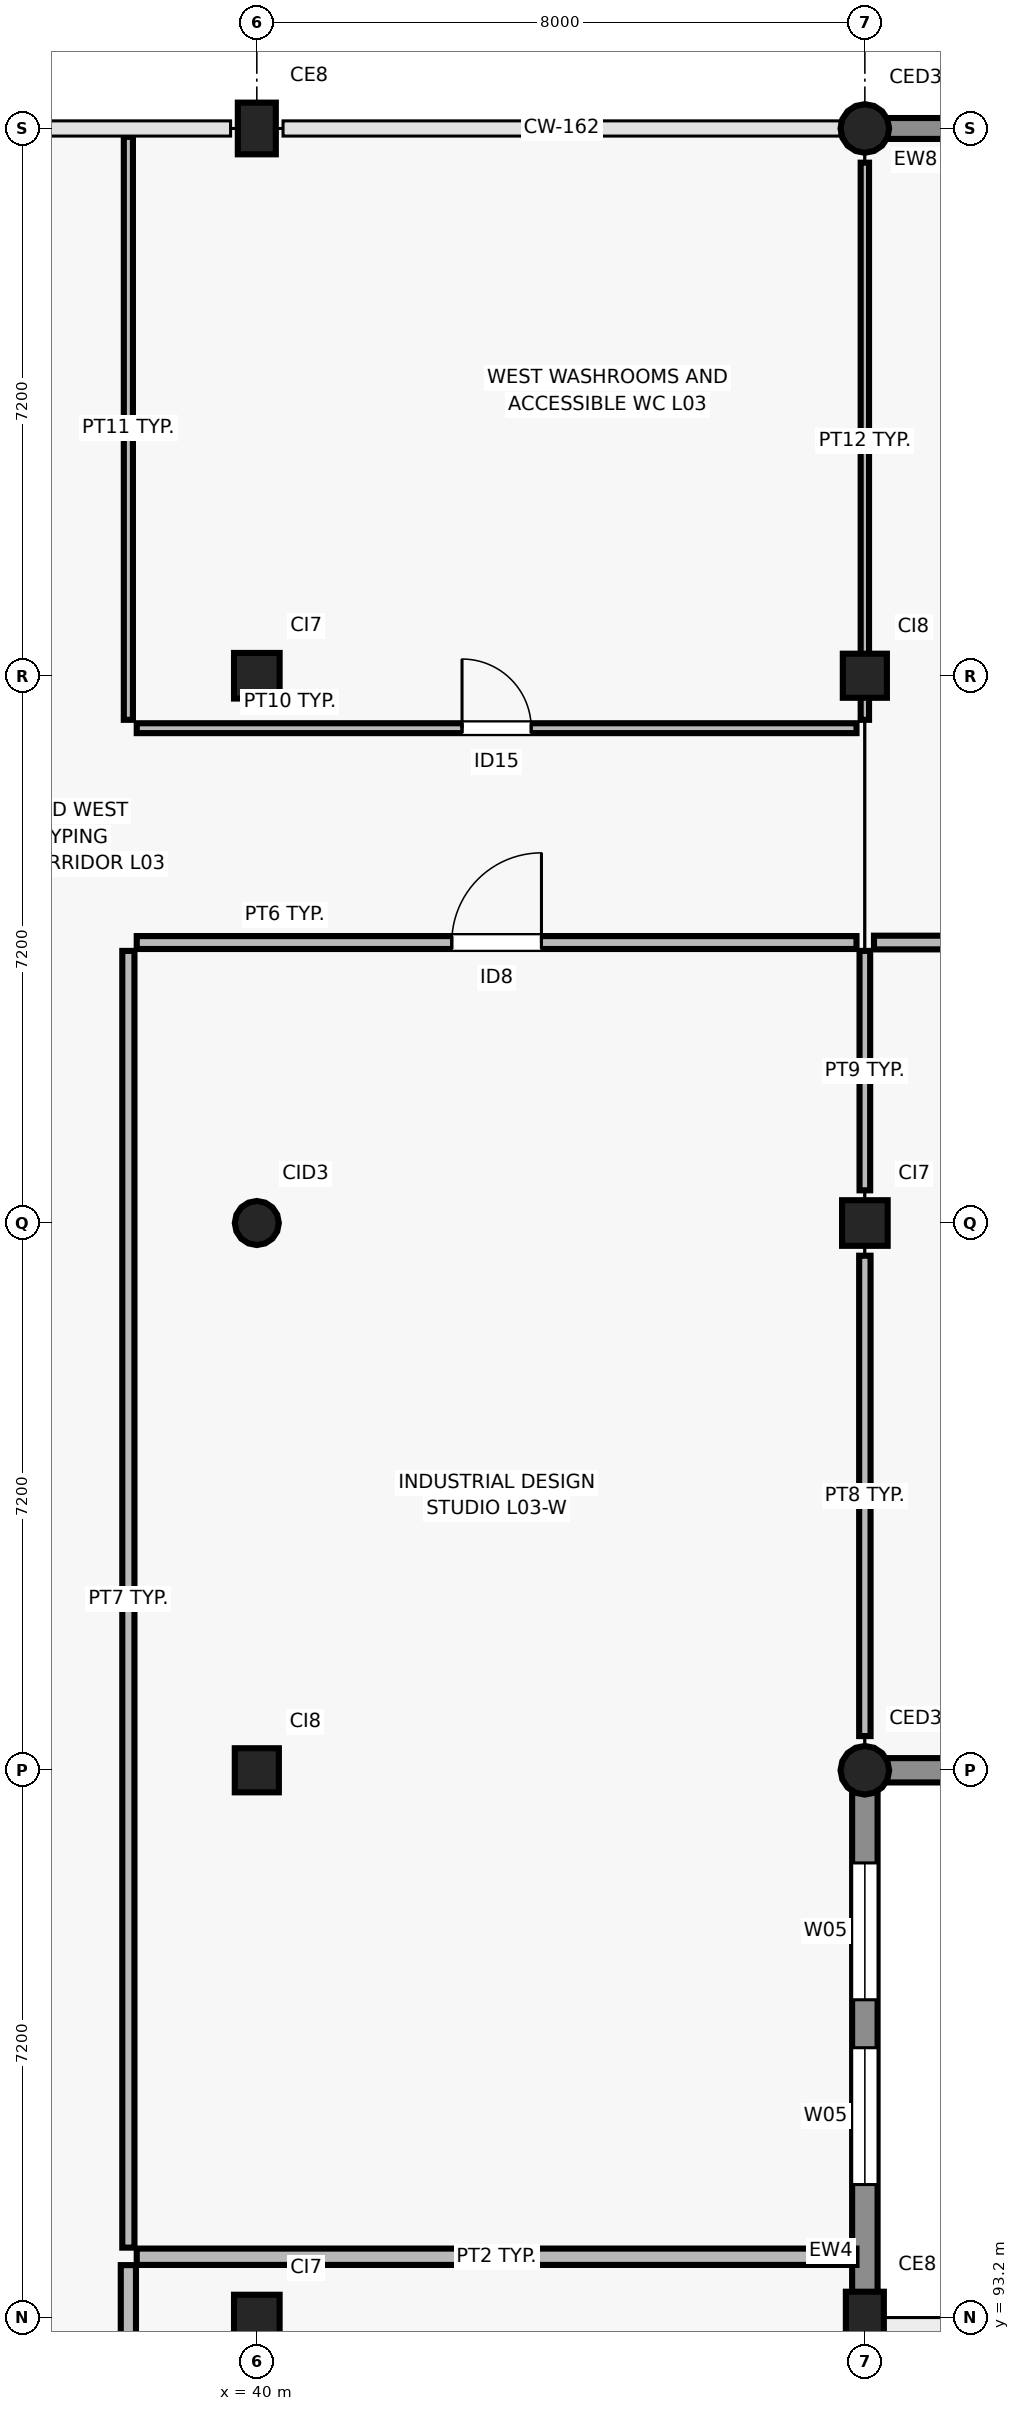
"""IFC4 building model, lengths in metres.
Left out: names, types, materials, properties, quantities, classifications, styles, units other than length and angle.
Written with IfcOpenShell. Run it as: python <this file> out.ifc"""

import sys

from ifc_helpers import new_model, si_unit, direction, frame, frame_2d, origin, origin_2d, place, context, subcontext, project, spatial, rectangle, circle, extrude, element, fill, save


model = new_model("IFC4")
c1 = context("Model", 3, precision=1e-05, world=origin(), true_north=direction((0.0, 1.0)))
c2 = subcontext(c1, "Body", "Model", "MODEL_VIEW")
j1 = project(units=[si_unit("LENGTHUNIT", "METRE"), si_unit("PLANEANGLEUNIT", "RADIAN")], contexts=[c1])
p1 = place(None, origin())
s1 = spatial("IfcSite", under=j1, at=p1, CompositionType="ELEMENT")
p2 = place(p1, origin())
s2 = spatial("IfcBuilding", under=s1, at=p2, CompositionType="ELEMENT")
p3 = place(p2, frame((0.0, 0.0, 13.2)))
s3 = spatial("IfcBuildingStorey", under=s2, at=p3, CompositionType="ELEMENT", Elevation=13.2)
p4 = place(p3, frame((40.0, 93.2, 0.0), z_axis=(0.0, 0.0, 1.0), x_axis=(1.0, 0.0, 0.0)))
e1 = element("IfcColumn", 1, at=p4, inside=s3, PredefinedType="COLUMN", context=c2, shape_type="SweptSolid", body=[
    extrude(rectangle(XDim=0.6, YDim=0.6, at=origin_2d()), origin(), (0.0, 0.0, 1.0), 4.2),
])
p5 = place(p3, frame((40.0, 100.4, 0.0), z_axis=(0.0, 0.0, 1.0), x_axis=(1.0, 0.0, 0.0)))
e2 = element("IfcColumn", 2, at=p5, inside=s3, PredefinedType="COLUMN", context=c2, shape_type="SweptSolid", body=[
    extrude(rectangle(XDim=0.58, YDim=0.58, at=origin_2d()), origin(), (0.0, 0.0, 1.0), 4.2),
])
p6 = place(p3, frame((40.0, 107.6, 0.0), z_axis=(0.0, 0.0, 1.0), x_axis=(1.0, 0.0, 0.0)))
e3 = element("IfcColumn", 3, at=p6, inside=s3, PredefinedType="COLUMN", context=c2, shape_type="SweptSolid", body=[
    extrude(circle(Radius=0.29, at=origin_2d()), origin(), (0.0, 0.0, 1.0), 4.2),
])
p7 = place(p3, frame((40.0, 114.8, 0.0), z_axis=(0.0, 0.0, 1.0), x_axis=(1.0, 0.0, 0.0)))
e4 = element("IfcColumn", 4, at=p7, inside=s3, PredefinedType="COLUMN", context=c2, shape_type="SweptSolid", body=[
    extrude(rectangle(XDim=0.6, YDim=0.6, at=origin_2d()), origin(), (0.0, 0.0, 1.0), 4.2),
])
for number, where, z_axis, x_axis in (
    (5, (40.0, 122.0, 0.0), (0.0, 0.0, 1.0), (1.0, 0.0, 0.0)),
    (6, (48.0, 93.2, 0.0), (0.0, 0.0, 1.0), (1.0, 0.0, 0.0)),
):
    element("IfcColumn", number, at=place(p3, frame(where, z_axis=z_axis, x_axis=x_axis)), inside=s3, PredefinedType="COLUMN", context=c2, shape_type="SweptSolid", body=[
        extrude(rectangle(XDim=0.68, YDim=0.5, at=origin_2d()), origin(), (0.0, 0.0, 1.0), 4.2),
    ])
p8 = place(p3, frame((48.0, 100.4, 0.0), z_axis=(0.0, 0.0, 1.0), x_axis=(1.0, 0.0, 0.0)))
e7 = element("IfcColumn", 7, at=p8, inside=s3, PredefinedType="COLUMN", context=c2, shape_type="SweptSolid", body=[
    extrude(circle(Radius=0.32, at=origin_2d()), origin(), (0.0, 0.0, 1.0), 4.2),
])
p9 = place(p3, frame((48.0, 107.6, 0.0), z_axis=(0.0, 0.0, 1.0), x_axis=(1.0, 0.0, 0.0)))
e8 = element("IfcColumn", 8, at=p9, inside=s3, PredefinedType="COLUMN", context=c2, shape_type="SweptSolid", body=[
    extrude(rectangle(XDim=0.6, YDim=0.6, at=origin_2d()), origin(), (0.0, 0.0, 1.0), 4.2),
])
p10 = place(p3, frame((48.0, 114.8, 0.0), z_axis=(0.0, 0.0, 1.0), x_axis=(1.0, 0.0, 0.0)))
e9 = element("IfcColumn", 9, at=p10, inside=s3, PredefinedType="COLUMN", context=c2, shape_type="SweptSolid", body=[
    extrude(rectangle(XDim=0.58, YDim=0.58, at=origin_2d()), origin(), (0.0, 0.0, 1.0), 4.2),
])
p11 = place(p3, frame((48.0, 122.0, 0.0), z_axis=(0.0, 0.0, 1.0), x_axis=(1.0, 0.0, 0.0)))
e10 = element("IfcColumn", 10, at=p11, inside=s3, PredefinedType="COLUMN", context=c2, shape_type="SweptSolid", body=[
    extrude(circle(Radius=0.32, at=origin_2d()), origin(), (0.0, 0.0, 1.0), 4.2),
])
p12 = place(p3, frame((55.655, 122.0, 0.0), z_axis=(0.0, 0.0, 1.0), x_axis=(-1.0, 0.0, 0.0)))
e11 = element("IfcWall", 11, at=p12, inside=s3, PredefinedType="SOLIDWALL", context=c2, shape_type="SweptSolid", body=[
    extrude(rectangle(XDim=7.386, YDim=0.275, at=frame_2d((3.693, 0.0))), origin(), (0.0, 0.0, 1.0), 3.36),
])
p13 = place(p12, frame((1.635, 0.0, 0.9)))
e12 = element("IfcOpeningElement", 12, at=p13, cuts=e11, PredefinedType="OPENING", context=c2, shape_type="SweptSolid", body=[
    extrude(rectangle(XDim=1.4, YDim=1.8, at=frame_2d((0.7, 0.9))), frame((0.0, 0.147, 0.0), z_axis=(0.0, -1.0, 0.0), x_axis=(1.0, 0.0, 0.0)), (0.0, 0.0, 1.0), 0.295),
])
p14 = place(p12, frame((4.351, 0.0, 0.9)))
e13 = element("IfcOpeningElement", 13, at=p14, cuts=e11, PredefinedType="OPENING", context=c2, shape_type="SweptSolid", body=[
    extrude(rectangle(XDim=1.4, YDim=1.8, at=frame_2d((0.7, 0.9))), frame((0.0, 0.147, 0.0), z_axis=(0.0, -1.0, 0.0), x_axis=(1.0, 0.0, 0.0)), (0.0, 0.0, 1.0), 0.295),
])
p15 = place(p3, frame((48.0, 93.445, 0.0), z_axis=(0.0, 0.0, 1.0), x_axis=(0.0, 1.0, 0.0)))
e14 = element("IfcWall", 14, at=p15, inside=s3, PredefinedType="SOLIDWALL", context=c2, shape_type="SweptSolid", body=[
    extrude(rectangle(XDim=6.686, YDim=0.335, at=frame_2d((3.343, 0.0))), origin(), (0.0, 0.0, 1.0), 3.34),
])
p16 = place(p15, frame((1.505, 0.0, 0.9)))
e15 = element("IfcOpeningElement", 15, at=p16, cuts=e14, PredefinedType="OPENING", context=c2, shape_type="SweptSolid", body=[
    extrude(rectangle(XDim=1.8, YDim=1.8, at=frame_2d((0.9, 0.9))), frame((0.0, 0.177, 0.0), z_axis=(0.0, -1.0, 0.0), x_axis=(1.0, 0.0, 0.0)), (0.0, 0.0, 1.0), 0.355),
])
p17 = place(p15, frame((3.936, 0.0, 0.9)))
e16 = element("IfcOpeningElement", 16, at=p17, cuts=e14, PredefinedType="OPENING", context=c2, shape_type="SweptSolid", body=[
    extrude(rectangle(XDim=1.8, YDim=1.8, at=frame_2d((0.9, 0.9))), frame((0.0, 0.177, 0.0), z_axis=(0.0, -1.0, 0.0), x_axis=(1.0, 0.0, 0.0)), (0.0, 0.0, 1.0), 0.355),
])
p18 = place(p3, frame((48.269, 100.4, 0.0), z_axis=(0.0, 0.0, 1.0), x_axis=(1.0, 0.0, 0.0)))
e17 = element("IfcWall", 17, at=p18, inside=s3, PredefinedType="SOLIDWALL", context=c2, shape_type="SweptSolid", body=[
    extrude(rectangle(XDim=7.386, YDim=0.32, at=frame_2d((3.693, 0.0))), origin(), (0.0, 0.0, 1.0), 3.46),
])
p19 = place(p18, frame((1.635, 0.0, 0.9)))
e18 = element("IfcOpeningElement", 18, at=p19, cuts=e17, PredefinedType="OPENING", context=c2, shape_type="SweptSolid", body=[
    extrude(rectangle(XDim=1.4, YDim=1.8, at=frame_2d((0.7, 0.9))), frame((0.0, 0.17, 0.0), z_axis=(0.0, -1.0, 0.0), x_axis=(1.0, 0.0, 0.0)), (0.0, 0.0, 1.0), 0.34),
])
p20 = place(p18, frame((4.351, 0.0, 0.9)))
e19 = element("IfcOpeningElement", 19, at=p20, cuts=e17, PredefinedType="OPENING", context=c2, shape_type="SweptSolid", body=[
    extrude(rectangle(XDim=1.4, YDim=1.8, at=frame_2d((0.7, 0.9))), frame((0.0, 0.17, 0.0), z_axis=(0.0, -1.0, 0.0), x_axis=(1.0, 0.0, 0.0)), (0.0, 0.0, 1.0), 0.34),
])
p21 = place(p3, frame((38.42, 94.0, 0.0), z_axis=(0.0, 0.0, 1.0), x_axis=(1.0, 0.0, 0.0)))
e20 = element("IfcWall", 20, at=p21, inside=s3, PredefinedType="PARTITIONING", context=c2, shape_type="SweptSolid", body=[
    extrude(rectangle(XDim=9.47, YDim=0.215, at=frame_2d((4.735, 0.0))), origin(), (0.0, 0.0, 1.0), 3.9),
])
p22 = place(p3, frame((38.31, 72.12, 0.0), z_axis=(0.0, 0.0, 1.0), x_axis=(0.0, 1.0, 0.0)))
e21 = element("IfcWall", 21, at=p22, inside=s3, PredefinedType="SOLIDWALL", context=c2, shape_type="SweptSolid", body=[
    extrude(rectangle(XDim=21.77, YDim=0.2, at=frame_2d((10.885, 0.0))), origin(), (0.0, 0.0, 1.0), 3.9),
])
p23 = place(p22, frame((10.245, 0.0, 0.0)))
e22 = element("IfcOpeningElement", 22, at=p23, cuts=e21, PredefinedType="OPENING", context=c2, shape_type="SweptSolid", body=[
    extrude(rectangle(XDim=1.28, YDim=2.2, at=frame_2d((0.64, 1.1))), frame((0.0, 0.11, 0.0), z_axis=(0.0, -1.0, 0.0), x_axis=(1.0, 0.0, 0.0)), (0.0, 0.0, 1.0), 0.22),
])
p24 = place(p3, frame((38.42, 111.29, 0.0), z_axis=(0.0, 0.0, 1.0), x_axis=(1.0, 0.0, 0.0)))
e23 = element("IfcWall", 23, at=p24, inside=s3, PredefinedType="PARTITIONING", context=c2, shape_type="SweptSolid", body=[
    extrude(rectangle(XDim=9.47, YDim=0.17, at=frame_2d((4.735, 0.0))), origin(), (0.0, 0.0, 1.0), 3.54),
])
p25 = place(p24, frame((4.145, 0.0, 0.0)))
e24 = element("IfcOpeningElement", 24, at=p25, cuts=e23, PredefinedType="OPENING", context=c2, shape_type="SweptSolid", body=[
    extrude(rectangle(XDim=1.18, YDim=2.2, at=frame_2d((0.59, 1.1))), frame((0.0, 0.095, 0.0), z_axis=(0.0, -1.0, 0.0), x_axis=(1.0, 0.0, 0.0)), (0.0, 0.0, 1.0), 0.19),
])
p26 = place(p3, frame((38.31, 94.12, 0.0), z_axis=(0.0, 0.0, 1.0), x_axis=(0.0, 1.0, 0.0)))
e25 = element("IfcWall", 25, at=p26, inside=s3, PredefinedType="PARTITIONING", context=c2, shape_type="SweptSolid", body=[
    extrude(rectangle(XDim=17.06, YDim=0.16, at=frame_2d((8.53, 0.0))), origin(), (0.0, 0.0, 1.0), 3.9),
])
p27 = place(p3, frame((48.0, 100.85, 0.0), z_axis=(0.0, 0.0, 1.0), x_axis=(0.0, 1.0, 0.0)))
e26 = element("IfcWall", 26, at=p27, inside=s3, PredefinedType="PARTITIONING", context=c2, shape_type="SweptSolid", body=[
    extrude(rectangle(XDim=6.32, YDim=0.15, at=frame_2d((3.16, 0.0))), origin(), (0.0, 0.0, 1.0), 3.48),
])
p28 = place(p3, frame((48.0, 108.03, 0.0), z_axis=(0.0, 0.0, 1.0), x_axis=(0.0, 1.0, 0.0)))
e27 = element("IfcWall", 27, at=p28, inside=s3, PredefinedType="PARTITIONING", context=c2, shape_type="SweptSolid", body=[
    extrude(rectangle(XDim=3.15, YDim=0.14, at=frame_2d((1.575, 0.0))), origin(), (0.0, 0.0, 1.0), 3.51),
])
p29 = place(p3, frame((38.42, 114.11, 0.0), z_axis=(0.0, 0.0, 1.0), x_axis=(1.0, 0.0, 0.0)))
e28 = element("IfcWall", 28, at=p29, inside=s3, PredefinedType="PARTITIONING", context=c2, shape_type="SweptSolid", body=[
    extrude(rectangle(XDim=9.47, YDim=0.13, at=frame_2d((4.735, 0.0))), origin(), (0.0, 0.0, 1.0), 3.9),
])
p30 = place(p29, frame((4.28, 0.0, 0.0)))
e29 = element("IfcOpeningElement", 29, at=p30, cuts=e28, PredefinedType="OPENING", context=c2, shape_type="SweptSolid", body=[
    extrude(rectangle(XDim=0.91, YDim=2.1, at=frame_2d((0.455, 1.05))), frame((0.0, 0.075, 0.0), z_axis=(0.0, -1.0, 0.0), x_axis=(1.0, 0.0, 0.0)), (0.0, 0.0, 1.0), 0.15),
])
p31 = place(p3, frame((38.31, 114.22, 0.0), z_axis=(0.0, 0.0, 1.0), x_axis=(0.0, 1.0, 0.0)))
e30 = element("IfcWall", 30, at=p31, inside=s3, PredefinedType="PARTITIONING", context=c2, shape_type="SweptSolid", body=[
    extrude(rectangle(XDim=7.67, YDim=0.12, at=frame_2d((3.835, 0.0))), origin(), (0.0, 0.0, 1.0), 3.9),
])
p32 = place(p3, frame((48.0, 114.22, 0.0), z_axis=(0.0, 0.0, 1.0), x_axis=(0.0, 1.0, 0.0)))
e31 = element("IfcWall", 31, at=p32, inside=s3, PredefinedType="PARTITIONING", context=c2, shape_type="SweptSolid", body=[
    extrude(rectangle(XDim=7.33, YDim=0.11, at=frame_2d((3.665, 0.0))), origin(), (0.0, 0.0, 1.0), 3.28),
])
p33 = place(p3, frame((48.12, 111.29, 0.0), z_axis=(0.0, 0.0, 1.0), x_axis=(1.0, 0.0, 0.0)))
e32 = element("IfcWall", 32, at=p33, inside=s3, PredefinedType="PARTITIONING", context=c2, shape_type="SweptSolid", body=[
    extrude(rectangle(XDim=43.77, YDim=0.18, at=frame_2d((21.885, 0.0))), origin(), (0.0, 0.0, 1.0), 3.5),
])
p34 = place(p33, frame((21.01, 0.0, 0.0)))
e33 = element("IfcOpeningElement", 33, at=p34, cuts=e32, PredefinedType="OPENING", context=c2, shape_type="SweptSolid", body=[
    extrude(rectangle(XDim=1.75, YDim=2.25, at=frame_2d((0.875, 1.125))), frame((0.0, 0.1, 0.0), z_axis=(0.0, -1.0, 0.0), x_axis=(1.0, 0.0, 0.0)), (0.0, 0.0, 1.0), 0.2),
])
p35 = place(p16, origin())
e34 = element("IfcWindow", 34, at=p35, inside=s3, PartitioningType="SINGLE_PANEL", PredefinedType="WINDOW", context=c2, shape_type="SweptSolid", body=[
    extrude(rectangle(XDim=1.8, YDim=1.8, at=frame_2d((0.9, 0.9))), frame((0.0, 0.03, 0.0), z_axis=(0.0, -1.0, 0.0), x_axis=(1.0, 0.0, 0.0)), (0.0, 0.0, 1.0), 0.06),
])
fill(e15, e34)
p36 = place(p17, origin())
e35 = element("IfcWindow", 35, at=p36, inside=s3, PartitioningType="SINGLE_PANEL", PredefinedType="WINDOW", context=c2, shape_type="SweptSolid", body=[
    extrude(rectangle(XDim=1.8, YDim=1.8, at=frame_2d((0.9, 0.9))), frame((0.0, 0.03, 0.0), z_axis=(0.0, -1.0, 0.0), x_axis=(1.0, 0.0, 0.0)), (0.0, 0.0, 1.0), 0.06),
])
fill(e16, e35)
p37 = place(p25, origin())
e36 = element("IfcDoor", 36, at=p37, inside=s3, OperationType="SINGLE_SWING_RIGHT", PredefinedType="DOOR", context=c2, shape_type="SweptSolid", body=[
    extrude(rectangle(XDim=1.18, YDim=2.2, at=frame_2d((0.59, 1.1))), frame((0.0, 0.025, 0.0), z_axis=(0.0, -1.0, 0.0), x_axis=(1.0, 0.0, 0.0)), (0.0, 0.0, 1.0), 0.05),
])
fill(e24, e36)
p38 = place(p30, origin())
e37 = element("IfcDoor", 37, at=p38, inside=s3, OperationType="SINGLE_SWING_LEFT", PredefinedType="DOOR", context=c2, shape_type="SweptSolid", body=[
    extrude(rectangle(XDim=0.91, YDim=2.1, at=frame_2d((0.455, 1.05))), frame((0.0, 0.025, 0.0), z_axis=(0.0, -1.0, 0.0), x_axis=(1.0, 0.0, 0.0)), (0.0, 0.0, 1.0), 0.05),
])
fill(e29, e37)
save(model, sys.argv[1])
